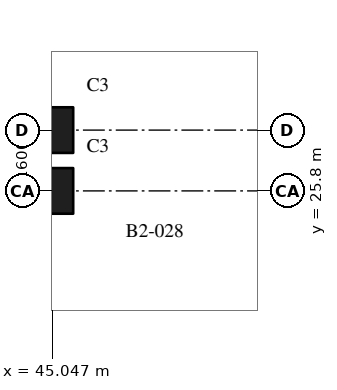
"""IFC4 building model, lengths in metres.
Left out: names, types, materials, properties, quantities, classifications, styles, units other than length and angle.
Written with IfcOpenShell. Run it as: python <this file> out.ifc"""

import sys

from ifc_helpers import new_model, si_unit, direction, frame, origin, origin_2d, place, context, subcontext, project, spatial, rectangle, extrude, element, save


model = new_model("IFC4")
c1 = context("Model", 3, precision=1e-05, world=origin(), true_north=direction((0.0, 1.0)))
c2 = subcontext(c1, "Body", "Model", "MODEL_VIEW")
j1 = project(units=[si_unit("LENGTHUNIT", "METRE"), si_unit("PLANEANGLEUNIT", "RADIAN")], contexts=[c1])
p1 = place(None, origin())
s1 = spatial("IfcSite", under=j1, at=p1, CompositionType="ELEMENT")
p2 = place(p1, origin())
s2 = spatial("IfcBuilding", under=s1, at=p2, CompositionType="ELEMENT")
p3 = place(p2, frame((0.0, 0.0, -12.0)))
s3 = spatial("IfcBuildingStorey", under=s2, at=p3, CompositionType="ELEMENT", Elevation=-12.0)
for number, where, z_axis, x_axis in (
    (1, (45.0, 25.8, 0.0), (0.0, 0.0, 1.0), (1.0, 0.0, 0.0)),
    (2, (45.0, 27.4, 0.0), (0.0, 0.0, 1.0), (1.0, 0.0, 0.0)),
):
    element("IfcColumn", number, at=place(p3, frame(where, z_axis=z_axis, x_axis=x_axis)), inside=s3, PredefinedType="COLUMN", context=c2, shape_type="SweptSolid", body=[
        extrude(rectangle(XDim=1.2, YDim=1.2, at=origin_2d()), origin(), (0.0, 0.0, 1.0), 5.0),
    ])
save(model, sys.argv[1])
